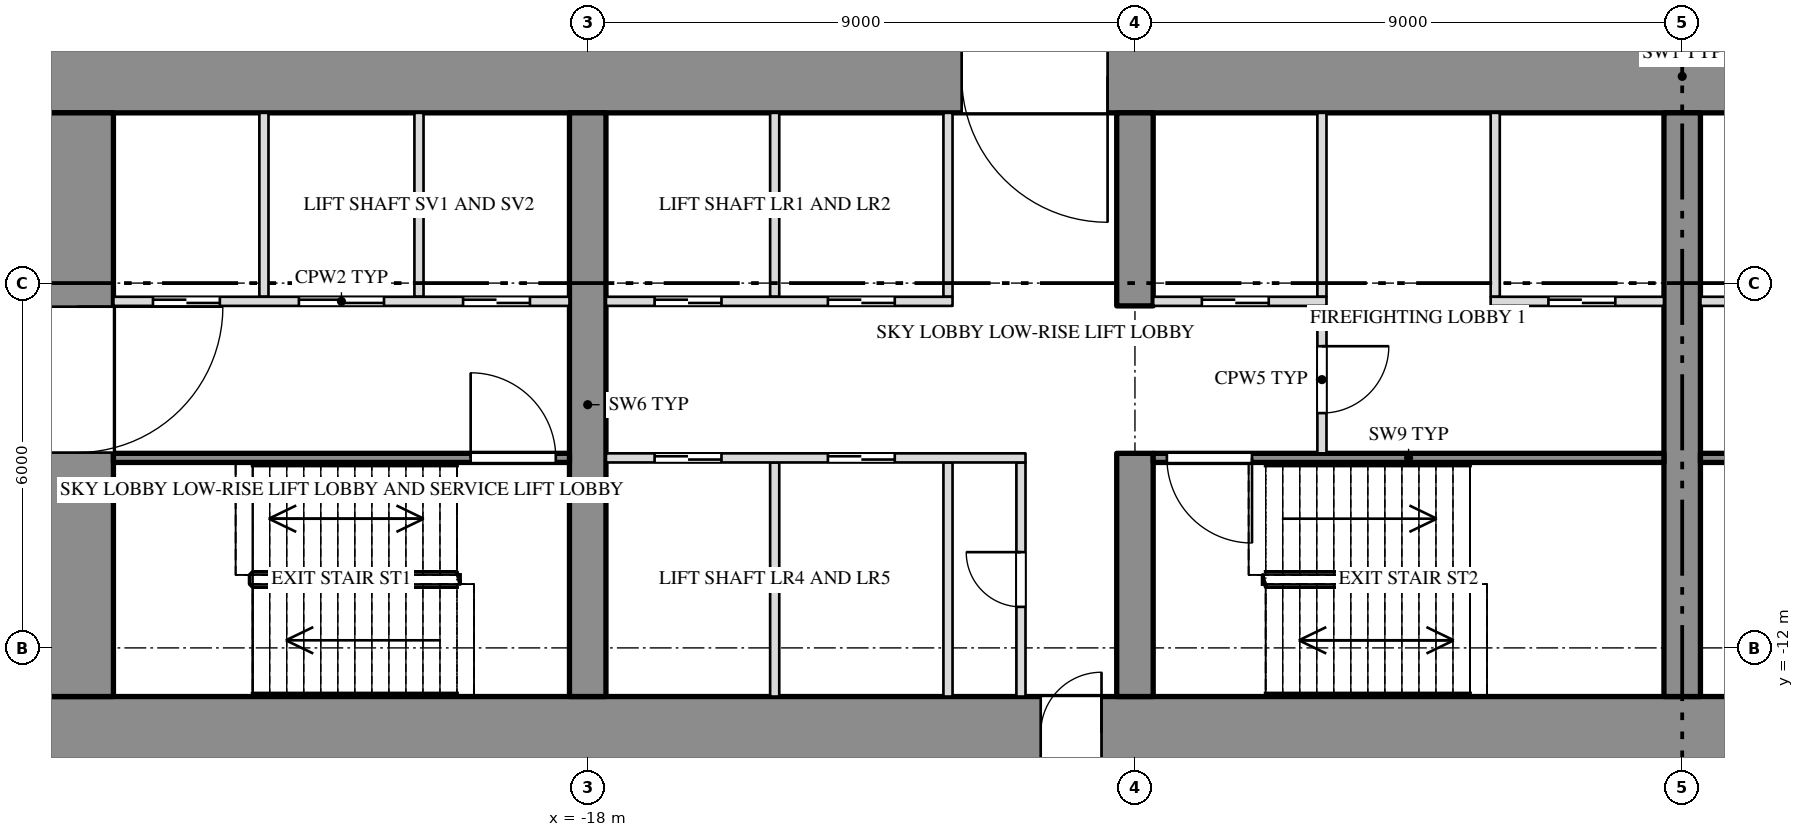
"""IFC4 building model, lengths in metres.
Left out: names, types, materials, properties, quantities, classifications, styles, units other than length and angle.
Written with IfcOpenShell. Run it as: python <this file> out.ifc"""

import sys

from ifc_helpers import new_model, si_unit, direction, frame, frame_2d, origin, place, context, subcontext, project, spatial, rectangle, extrude, element, fill, save


model = new_model("IFC4")
c1 = context("Model", 3, precision=1e-05, world=origin(), true_north=direction((0.0, 1.0)))
c2 = subcontext(c1, "Body", "Model", "MODEL_VIEW")
j1 = project(units=[si_unit("LENGTHUNIT", "METRE"), si_unit("PLANEANGLEUNIT", "RADIAN")], contexts=[c1])
p1 = place(None, origin())
s1 = spatial("IfcSite", under=j1, at=p1, CompositionType="ELEMENT")
p2 = place(p1, origin())
s2 = spatial("IfcBuilding", under=s1, at=p2, CompositionType="ELEMENT")
p3 = place(p2, frame((0.0, 0.0, 100.5)))
s3 = spatial("IfcBuildingStorey", under=s2, at=p3, CompositionType="ELEMENT", Elevation=100.5)
p4 = place(p3, frame((-27.0, -2.6, 0.0), z_axis=(0.0, 0.0, 1.0), x_axis=(1.0, 0.0, 0.0)))
e1 = element("IfcWall", 1, at=p4, inside=s3, PredefinedType="SHEAR", context=c2, shape_type="SweptSolid", body=[
    extrude(rectangle(XDim=54.0, YDim=1.2, at=frame_2d((27.0, 0.0))), origin(), (0.0, 0.0, 1.0), 3.65),
])
p5 = place(p4, frame((15.15, 0.0, 0.0)))
e2 = element("IfcOpeningElement", 2, at=p5, cuts=e1, PredefinedType="OPENING", context=c2, shape_type="SweptSolid", body=[
    extrude(rectangle(XDim=2.4, YDim=2.1, at=frame_2d((1.2, 1.05))), frame((0.0, 0.612, 0.0), z_axis=(0.0, -1.0, 0.0), x_axis=(1.0, 0.0, 0.0)), (0.0, 0.0, 1.0), 1.224),
])
p6 = place(p4, frame((36.45, 0.0, 0.0)))
e3 = element("IfcOpeningElement", 3, at=p6, cuts=e1, PredefinedType="OPENING", context=c2, shape_type="SweptSolid", body=[
    extrude(rectangle(XDim=2.4, YDim=2.1, at=frame_2d((1.2, 1.05))), frame((0.0, 0.612, 0.0), z_axis=(0.0, -1.0, 0.0), x_axis=(1.0, 0.0, 0.0)), (0.0, 0.0, 1.0), 1.224),
])
p7 = place(p3, frame((-27.0, -13.4, 0.0), z_axis=(0.0, 0.0, 1.0), x_axis=(1.0, 0.0, 0.0)))
e4 = element("IfcWall", 4, at=p7, inside=s3, PredefinedType="SHEAR", context=c2, shape_type="SweptSolid", body=[
    extrude(rectangle(XDim=54.0, YDim=1.2, at=frame_2d((27.0, 0.0))), origin(), (0.0, 0.0, 1.0), 3.65),
])
p8 = place(p7, frame((16.45, 0.0, 0.0)))
e5 = element("IfcOpeningElement", 5, at=p8, cuts=e4, PredefinedType="OPENING", context=c2, shape_type="SweptSolid", body=[
    extrude(rectangle(XDim=1.0, YDim=2.1, at=frame_2d((0.5, 1.05))), frame((0.0, 0.612, 0.0), z_axis=(0.0, -1.0, 0.0), x_axis=(1.0, 0.0, 0.0)), (0.0, 0.0, 1.0), 1.224),
])
p9 = place(p7, frame((36.55, 0.0, 0.0)))
e6 = element("IfcOpeningElement", 6, at=p9, cuts=e4, PredefinedType="OPENING", context=c2, shape_type="SweptSolid", body=[
    extrude(rectangle(XDim=1.0, YDim=2.1, at=frame_2d((0.5, 1.05))), frame((0.0, 0.612, 0.0), z_axis=(0.0, -1.0, 0.0), x_axis=(1.0, 0.0, 0.0)), (0.0, 0.0, 1.0), 1.224),
])
p10 = place(p3, frame((-26.4, -12.8, 0.0), z_axis=(0.0, 0.0, 1.0), x_axis=(0.0, 1.0, 0.0)))
e7 = element("IfcWall", 7, at=p10, inside=s3, PredefinedType="SHEAR", context=c2, shape_type="SweptSolid", body=[
    extrude(rectangle(XDim=9.6, YDim=1.2, at=frame_2d((4.8, 0.0))), origin(), (0.0, 0.0, 1.0), 3.65),
])
p11 = place(p10, frame((4.012, 0.0, 0.0)))
e8 = element("IfcOpeningElement", 8, at=p11, cuts=e7, PredefinedType="OPENING", context=c2, shape_type="SweptSolid", body=[
    extrude(rectangle(XDim=2.4, YDim=2.1, at=frame_2d((1.2, 1.05))), frame((0.0, 0.612, 0.0), z_axis=(0.0, -1.0, 0.0), x_axis=(1.0, 0.0, 0.0)), (0.0, 0.0, 1.0), 1.224),
])
p12 = place(p3, frame((-18.0, -12.8, 0.0), z_axis=(0.0, 0.0, 1.0), x_axis=(0.0, 1.0, 0.0)))
e9 = element("IfcWall", 9, at=p12, inside=s3, PredefinedType="SHEAR", context=c2, shape_type="SweptSolid", body=[
    extrude(rectangle(XDim=9.6, YDim=0.6, at=frame_2d((4.8, 0.0))), origin(), (0.0, 0.0, 1.0), 3.65),
])
p13 = place(p3, frame((-9.0, -12.8, 0.0), z_axis=(0.0, 0.0, 1.0), x_axis=(0.0, 1.0, 0.0)))
e10 = element("IfcWall", 10, at=p13, inside=s3, PredefinedType="SHEAR", context=c2, shape_type="SweptSolid", body=[
    extrude(rectangle(XDim=4.0, YDim=0.6, at=frame_2d((2.0, 0.0))), origin(), (0.0, 0.0, 1.0), 3.65),
])
p14 = place(p3, frame((-9.0, -6.375, 0.0), z_axis=(0.0, 0.0, 1.0), x_axis=(0.0, 1.0, 0.0)))
e11 = element("IfcWall", 11, at=p14, inside=s3, PredefinedType="SHEAR", context=c2, shape_type="SweptSolid", body=[
    extrude(rectangle(XDim=3.175, YDim=0.6, at=frame_2d((1.587, 0.0))), origin(), (0.0, 0.0, 1.0), 3.65),
])
p15 = place(p3, frame((0.0, -12.8, 0.0), z_axis=(0.0, 0.0, 1.0), x_axis=(0.0, 1.0, 0.0)))
e12 = element("IfcWall", 12, at=p15, inside=s3, PredefinedType="SHEAR", context=c2, shape_type="SweptSolid", body=[
    extrude(rectangle(XDim=9.6, YDim=0.6, at=frame_2d((4.8, 0.0))), origin(), (0.0, 0.0, 1.0), 3.65),
])
for number, where, z_axis, x_axis in (
    (13, (-20.775, -6.225, 0.0), (0.0, 0.0, 1.0), (0.0, 1.0, 0.0)),
    (14, (-23.325, -6.225, 0.0), (0.0, 0.0, 1.0), (0.0, 1.0, 0.0)),
    (15, (-12.075, -6.225, 0.0), (0.0, 0.0, 1.0), (0.0, 1.0, 0.0)),
    (16, (-14.925, -6.225, 0.0), (0.0, 0.0, 1.0), (0.0, 1.0, 0.0)),
    (17, (-3.075, -6.225, 0.0), (0.0, 0.0, 1.0), (0.0, 1.0, 0.0)),
    (18, (-5.925, -6.225, 0.0), (0.0, 0.0, 1.0), (0.0, 1.0, 0.0)),
):
    element("IfcWall", number, at=place(p3, frame(where, z_axis=z_axis, x_axis=x_axis)), inside=s3, PredefinedType="PARTITIONING", context=c2, shape_type="SweptSolid", body=[
        extrude(rectangle(XDim=3.025, YDim=0.15, at=frame_2d((1.513, 0.0))), origin(), (0.0, 0.0, 1.0), 3.65),
    ])
p16 = place(p3, frame((-10.875, -12.8, 0.0), z_axis=(0.0, 0.0, 1.0), x_axis=(0.0, 1.0, 0.0)))
e19 = element("IfcWall", 19, at=p16, inside=s3, PredefinedType="PARTITIONING", context=c2, shape_type="SweptSolid", body=[
    extrude(rectangle(XDim=3.85, YDim=0.15, at=frame_2d((1.925, 0.0))), origin(), (0.0, 0.0, 1.0), 3.65),
])
p17 = place(p16, frame((1.475, 0.0, 0.0)))
e20 = element("IfcOpeningElement", 20, at=p17, cuts=e19, PredefinedType="OPENING", context=c2, shape_type="SweptSolid", body=[
    extrude(rectangle(XDim=0.9, YDim=2.1, at=frame_2d((0.45, 1.05))), frame((0.0, 0.087, 0.0), z_axis=(0.0, -1.0, 0.0), x_axis=(1.0, 0.0, 0.0)), (0.0, 0.0, 1.0), 0.174),
])
for number, where, z_axis, x_axis in (
    (21, (-12.075, -12.8, 0.0), (0.0, 0.0, 1.0), (0.0, 1.0, 0.0)),
    (22, (-14.925, -12.8, 0.0), (0.0, 0.0, 1.0), (0.0, 1.0, 0.0)),
):
    element("IfcWall", number, at=place(p3, frame(where, z_axis=z_axis, x_axis=x_axis)), inside=s3, PredefinedType="PARTITIONING", context=c2, shape_type="SweptSolid", body=[
        extrude(rectangle(XDim=3.85, YDim=0.15, at=frame_2d((1.925, 0.0))), origin(), (0.0, 0.0, 1.0), 3.65),
    ])
p18 = place(p3, frame((-5.925, -8.8, 0.0), z_axis=(0.0, 0.0, 1.0), x_axis=(0.0, 1.0, 0.0)))
e23 = element("IfcWall", 23, at=p18, inside=s3, PredefinedType="PARTITIONING", context=c2, shape_type="SweptSolid", body=[
    extrude(rectangle(XDim=2.425, YDim=0.15, at=frame_2d((1.212, 0.0))), origin(), (0.0, 0.0, 1.0), 3.65),
])
p19 = place(p18, frame((0.662, 0.0, 0.0)))
e24 = element("IfcOpeningElement", 24, at=p19, cuts=e23, PredefinedType="OPENING", context=c2, shape_type="SweptSolid", body=[
    extrude(rectangle(XDim=1.1, YDim=2.1, at=frame_2d((0.55, 1.05))), frame((0.0, 0.087, 0.0), z_axis=(0.0, -1.0, 0.0), x_axis=(1.0, 0.0, 0.0)), (0.0, 0.0, 1.0), 0.174),
])
p20 = place(p3, frame((-25.8, -6.3, 0.0), z_axis=(0.0, 0.0, 1.0), x_axis=(1.0, 0.0, 0.0)))
e25 = element("IfcWall", 25, at=p20, inside=s3, PredefinedType="PARTITIONING", context=c2, shape_type="SweptSolid", body=[
    extrude(rectangle(XDim=7.5, YDim=0.15, at=frame_2d((3.75, 0.0))), origin(), (0.0, 0.0, 1.0), 3.65),
])
p21 = place(p20, frame((0.65, 0.0, 0.0)))
e26 = element("IfcOpeningElement", 26, at=p21, cuts=e25, PredefinedType="OPENING", context=c2, shape_type="SweptSolid", body=[
    extrude(rectangle(XDim=1.1, YDim=2.1, at=frame_2d((0.55, 1.05))), frame((0.0, 0.087, 0.0), z_axis=(0.0, -1.0, 0.0), x_axis=(1.0, 0.0, 0.0)), (0.0, 0.0, 1.0), 0.174),
])
p22 = place(p20, frame((3.05, 0.0, 0.0)))
e27 = element("IfcOpeningElement", 27, at=p22, cuts=e25, PredefinedType="OPENING", context=c2, shape_type="SweptSolid", body=[
    extrude(rectangle(XDim=1.4, YDim=2.1, at=frame_2d((0.7, 1.05))), frame((0.0, 0.087, 0.0), z_axis=(0.0, -1.0, 0.0), x_axis=(1.0, 0.0, 0.0)), (0.0, 0.0, 1.0), 0.174),
])
p23 = place(p20, frame((5.75, 0.0, 0.0)))
e28 = element("IfcOpeningElement", 28, at=p23, cuts=e25, PredefinedType="OPENING", context=c2, shape_type="SweptSolid", body=[
    extrude(rectangle(XDim=1.1, YDim=2.1, at=frame_2d((0.55, 1.05))), frame((0.0, 0.087, 0.0), z_axis=(0.0, -1.0, 0.0), x_axis=(1.0, 0.0, 0.0)), (0.0, 0.0, 1.0), 0.174),
])
p24 = place(p3, frame((-17.7, -6.3, 0.0), z_axis=(0.0, 0.0, 1.0), x_axis=(1.0, 0.0, 0.0)))
e29 = element("IfcWall", 29, at=p24, inside=s3, PredefinedType="PARTITIONING", context=c2, shape_type="SweptSolid", body=[
    extrude(rectangle(XDim=5.7, YDim=0.15, at=frame_2d((2.85, 0.0))), origin(), (0.0, 0.0, 1.0), 3.65),
])
p25 = place(p24, frame((0.8, 0.0, 0.0)))
e30 = element("IfcOpeningElement", 30, at=p25, cuts=e29, PredefinedType="OPENING", context=c2, shape_type="SweptSolid", body=[
    extrude(rectangle(XDim=1.1, YDim=2.1, at=frame_2d((0.55, 1.05))), frame((0.0, 0.087, 0.0), z_axis=(0.0, -1.0, 0.0), x_axis=(1.0, 0.0, 0.0)), (0.0, 0.0, 1.0), 0.174),
])
p26 = place(p24, frame((3.65, 0.0, 0.0)))
e31 = element("IfcOpeningElement", 31, at=p26, cuts=e29, PredefinedType="OPENING", context=c2, shape_type="SweptSolid", body=[
    extrude(rectangle(XDim=1.1, YDim=2.1, at=frame_2d((0.55, 1.05))), frame((0.0, 0.087, 0.0), z_axis=(0.0, -1.0, 0.0), x_axis=(1.0, 0.0, 0.0)), (0.0, 0.0, 1.0), 0.174),
])
p27 = place(p3, frame((-8.7, -6.3, 0.0), z_axis=(0.0, 0.0, 1.0), x_axis=(1.0, 0.0, 0.0)))
e32 = element("IfcWall", 32, at=p27, inside=s3, PredefinedType="PARTITIONING", context=c2, shape_type="SweptSolid", body=[
    extrude(rectangle(XDim=2.85, YDim=0.15, at=frame_2d((1.425, 0.0))), origin(), (0.0, 0.0, 1.0), 3.65),
])
p28 = place(p27, frame((0.8, 0.0, 0.0)))
e33 = element("IfcOpeningElement", 33, at=p28, cuts=e32, PredefinedType="OPENING", context=c2, shape_type="SweptSolid", body=[
    extrude(rectangle(XDim=1.1, YDim=2.1, at=frame_2d((0.55, 1.05))), frame((0.0, 0.087, 0.0), z_axis=(0.0, -1.0, 0.0), x_axis=(1.0, 0.0, 0.0)), (0.0, 0.0, 1.0), 0.174),
])
p29 = place(p3, frame((-3.15, -6.3, 0.0), z_axis=(0.0, 0.0, 1.0), x_axis=(1.0, 0.0, 0.0)))
e34 = element("IfcWall", 34, at=p29, inside=s3, PredefinedType="PARTITIONING", context=c2, shape_type="SweptSolid", body=[
    extrude(rectangle(XDim=2.85, YDim=0.15, at=frame_2d((1.425, 0.0))), origin(), (0.0, 0.0, 1.0), 3.65),
])
p30 = place(p29, frame((0.95, 0.0, 0.0)))
e35 = element("IfcOpeningElement", 35, at=p30, cuts=e34, PredefinedType="OPENING", context=c2, shape_type="SweptSolid", body=[
    extrude(rectangle(XDim=1.1, YDim=2.1, at=frame_2d((0.55, 1.05))), frame((0.0, 0.087, 0.0), z_axis=(0.0, -1.0, 0.0), x_axis=(1.0, 0.0, 0.0)), (0.0, 0.0, 1.0), 0.174),
])
p31 = place(p3, frame((0.3, -6.3, 0.0), z_axis=(0.0, 0.0, 1.0), x_axis=(1.0, 0.0, 0.0)))
e36 = element("IfcWall", 36, at=p31, inside=s3, PredefinedType="PARTITIONING", context=c2, shape_type="SweptSolid", body=[
    extrude(rectangle(XDim=2.85, YDim=0.15, at=frame_2d((1.425, 0.0))), origin(), (0.0, 0.0, 1.0), 3.65),
])
p32 = place(p31, frame((0.8, 0.0, 0.0)))
e37 = element("IfcOpeningElement", 37, at=p32, cuts=e36, PredefinedType="OPENING", context=c2, shape_type="SweptSolid", body=[
    extrude(rectangle(XDim=1.1, YDim=2.1, at=frame_2d((0.55, 1.05))), frame((0.0, 0.087, 0.0), z_axis=(0.0, -1.0, 0.0), x_axis=(1.0, 0.0, 0.0)), (0.0, 0.0, 1.0), 0.174),
])
p33 = place(p3, frame((-25.8, -8.875, 0.0), z_axis=(0.0, 0.0, 1.0), x_axis=(1.0, 0.0, 0.0)))
e38 = element("IfcWall", 38, at=p33, inside=s3, PredefinedType="SHEAR", context=c2, shape_type="SweptSolid", body=[
    extrude(rectangle(XDim=7.5, YDim=0.15, at=frame_2d((3.75, 0.0))), origin(), (0.0, 0.0, 1.0), 3.65),
])
p34 = place(p33, frame((5.875, 0.0, 0.0)))
e39 = element("IfcOpeningElement", 39, at=p34, cuts=e38, PredefinedType="OPENING", context=c2, shape_type="SweptSolid", body=[
    extrude(rectangle(XDim=1.4, YDim=2.1, at=frame_2d((0.7, 1.05))), frame((0.0, 0.087, 0.0), z_axis=(0.0, -1.0, 0.0), x_axis=(1.0, 0.0, 0.0)), (0.0, 0.0, 1.0), 0.174),
])
p35 = place(p3, frame((-17.7, -8.875, 0.0), z_axis=(0.0, 0.0, 1.0), x_axis=(1.0, 0.0, 0.0)))
e40 = element("IfcWall", 40, at=p35, inside=s3, PredefinedType="PARTITIONING", context=c2, shape_type="SweptSolid", body=[
    extrude(rectangle(XDim=6.9, YDim=0.15, at=frame_2d((3.45, 0.0))), origin(), (0.0, 0.0, 1.0), 3.65),
])
p36 = place(p35, frame((0.8, 0.0, 0.0)))
e41 = element("IfcOpeningElement", 41, at=p36, cuts=e40, PredefinedType="OPENING", context=c2, shape_type="SweptSolid", body=[
    extrude(rectangle(XDim=1.1, YDim=2.1, at=frame_2d((0.55, 1.05))), frame((0.0, 0.087, 0.0), z_axis=(0.0, -1.0, 0.0), x_axis=(1.0, 0.0, 0.0)), (0.0, 0.0, 1.0), 0.174),
])
p37 = place(p35, frame((3.65, 0.0, 0.0)))
e42 = element("IfcOpeningElement", 42, at=p37, cuts=e40, PredefinedType="OPENING", context=c2, shape_type="SweptSolid", body=[
    extrude(rectangle(XDim=1.1, YDim=2.1, at=frame_2d((0.55, 1.05))), frame((0.0, 0.087, 0.0), z_axis=(0.0, -1.0, 0.0), x_axis=(1.0, 0.0, 0.0)), (0.0, 0.0, 1.0), 0.174),
])
p38 = place(p3, frame((-8.7, -8.875, 0.0), z_axis=(0.0, 0.0, 1.0), x_axis=(1.0, 0.0, 0.0)))
e43 = element("IfcWall", 43, at=p38, inside=s3, PredefinedType="SHEAR", context=c2, shape_type="SweptSolid", body=[
    extrude(rectangle(XDim=8.4, YDim=0.15, at=frame_2d((4.2, 0.0))), origin(), (0.0, 0.0, 1.0), 3.65),
])
p39 = place(p38, frame((0.225, 0.0, 0.0)))
e44 = element("IfcOpeningElement", 44, at=p39, cuts=e43, PredefinedType="OPENING", context=c2, shape_type="SweptSolid", body=[
    extrude(rectangle(XDim=1.4, YDim=2.1, at=frame_2d((0.7, 1.05))), frame((0.0, 0.087, 0.0), z_axis=(0.0, -1.0, 0.0), x_axis=(1.0, 0.0, 0.0)), (0.0, 0.0, 1.0), 0.174),
])
p40 = place(p3, frame((0.3, -8.875, 0.0), z_axis=(0.0, 0.0, 1.0), x_axis=(1.0, 0.0, 0.0)))
e45 = element("IfcWall", 45, at=p40, inside=s3, PredefinedType="SHEAR", context=c2, shape_type="SweptSolid", body=[
    extrude(rectangle(XDim=8.4, YDim=0.15, at=frame_2d((4.2, 0.0))), origin(), (0.0, 0.0, 1.0), 3.65),
])
p41 = place(p40, frame((6.775, 0.0, 0.0)))
e46 = element("IfcOpeningElement", 46, at=p41, cuts=e45, PredefinedType="OPENING", context=c2, shape_type="SweptSolid", body=[
    extrude(rectangle(XDim=1.4, YDim=2.1, at=frame_2d((0.7, 1.05))), frame((0.0, 0.087, 0.0), z_axis=(0.0, -1.0, 0.0), x_axis=(1.0, 0.0, 0.0)), (0.0, 0.0, 1.0), 0.174),
])
p42 = place(p11, origin())
e47 = element("IfcDoor", 47, at=p42, inside=s3, OperationType="DOUBLE_DOOR_SINGLE_SWING", PredefinedType="DOOR", context=c2, shape_type="SweptSolid", body=[
    extrude(rectangle(XDim=2.4, YDim=2.1, at=frame_2d((1.2, 1.05))), frame((0.0, 0.025, 0.0), z_axis=(0.0, -1.0, 0.0), x_axis=(1.0, 0.0, 0.0)), (0.0, 0.0, 1.0), 0.05),
])
fill(e8, e47)
p43 = place(p21, origin())
e48 = element("IfcDoor", 48, at=p43, inside=s3, OperationType="SLIDING_TO_RIGHT", PredefinedType="DOOR", context=c2, shape_type="SweptSolid", body=[
    extrude(rectangle(XDim=1.1, YDim=2.1, at=frame_2d((0.55, 1.05))), frame((0.0, 0.025, 0.0), z_axis=(0.0, -1.0, 0.0), x_axis=(1.0, 0.0, 0.0)), (0.0, 0.0, 1.0), 0.05),
])
fill(e26, e48)
p44 = place(p22, origin())
e49 = element("IfcDoor", 49, at=p44, inside=s3, OperationType="SLIDING_TO_LEFT", PredefinedType="DOOR", context=c2, shape_type="SweptSolid", body=[
    extrude(rectangle(XDim=1.4, YDim=2.1, at=frame_2d((0.7, 1.05))), frame((0.0, 0.025, 0.0), z_axis=(0.0, -1.0, 0.0), x_axis=(1.0, 0.0, 0.0)), (0.0, 0.0, 1.0), 0.05),
])
fill(e27, e49)
p45 = place(p23, origin())
e50 = element("IfcDoor", 50, at=p45, inside=s3, OperationType="SLIDING_TO_RIGHT", PredefinedType="DOOR", context=c2, shape_type="SweptSolid", body=[
    extrude(rectangle(XDim=1.1, YDim=2.1, at=frame_2d((0.55, 1.05))), frame((0.0, 0.025, 0.0), z_axis=(0.0, -1.0, 0.0), x_axis=(1.0, 0.0, 0.0)), (0.0, 0.0, 1.0), 0.05),
])
fill(e28, e50)
p46 = place(p34, origin())
e51 = element("IfcDoor", 51, at=p46, inside=s3, OperationType="DOUBLE_DOOR_SINGLE_SWING", PredefinedType="DOOR", context=c2, shape_type="SweptSolid", body=[
    extrude(rectangle(XDim=1.4, YDim=2.1, at=frame_2d((0.7, 1.05))), frame((0.0, 0.025, 0.0), z_axis=(0.0, -1.0, 0.0), x_axis=(1.0, 0.0, 0.0)), (0.0, 0.0, 1.0), 0.05),
])
fill(e39, e51)
p47 = place(p36, origin())
e52 = element("IfcDoor", 52, at=p47, inside=s3, OperationType="SLIDING_TO_RIGHT", PredefinedType="DOOR", context=c2, shape_type="SweptSolid", body=[
    extrude(rectangle(XDim=1.1, YDim=2.1, at=frame_2d((0.55, 1.05))), frame((0.0, 0.025, 0.0), z_axis=(0.0, -1.0, 0.0), x_axis=(1.0, 0.0, 0.0)), (0.0, 0.0, 1.0), 0.05),
])
fill(e41, e52)
p48 = place(p25, origin())
e53 = element("IfcDoor", 53, at=p48, inside=s3, OperationType="SLIDING_TO_LEFT", PredefinedType="DOOR", context=c2, shape_type="SweptSolid", body=[
    extrude(rectangle(XDim=1.1, YDim=2.1, at=frame_2d((0.55, 1.05))), frame((0.0, 0.025, 0.0), z_axis=(0.0, -1.0, 0.0), x_axis=(1.0, 0.0, 0.0)), (0.0, 0.0, 1.0), 0.05),
])
fill(e30, e53)
p49 = place(p37, origin())
e54 = element("IfcDoor", 54, at=p49, inside=s3, OperationType="SLIDING_TO_RIGHT", PredefinedType="DOOR", context=c2, shape_type="SweptSolid", body=[
    extrude(rectangle(XDim=1.1, YDim=2.1, at=frame_2d((0.55, 1.05))), frame((0.0, 0.025, 0.0), z_axis=(0.0, -1.0, 0.0), x_axis=(1.0, 0.0, 0.0)), (0.0, 0.0, 1.0), 0.05),
])
fill(e42, e54)
p50 = place(p26, origin())
e55 = element("IfcDoor", 55, at=p50, inside=s3, OperationType="SLIDING_TO_LEFT", PredefinedType="DOOR", context=c2, shape_type="SweptSolid", body=[
    extrude(rectangle(XDim=1.1, YDim=2.1, at=frame_2d((0.55, 1.05))), frame((0.0, 0.025, 0.0), z_axis=(0.0, -1.0, 0.0), x_axis=(1.0, 0.0, 0.0)), (0.0, 0.0, 1.0), 0.05),
])
fill(e31, e55)
p51 = place(p17, origin())
e56 = element("IfcDoor", 56, at=p51, inside=s3, OperationType="SINGLE_SWING_RIGHT", PredefinedType="DOOR", context=c2, shape_type="SweptSolid", body=[
    extrude(rectangle(XDim=0.9, YDim=2.1, at=frame_2d((0.45, 1.05))), frame((0.0, 0.025, 0.0), z_axis=(0.0, -1.0, 0.0), x_axis=(1.0, 0.0, 0.0)), (0.0, 0.0, 1.0), 0.05),
])
fill(e20, e56)
p52 = place(p5, origin())
e57 = element("IfcDoor", 57, at=p52, inside=s3, OperationType="DOUBLE_DOOR_SINGLE_SWING", PredefinedType="DOOR", context=c2, shape_type="SweptSolid", body=[
    extrude(rectangle(XDim=2.4, YDim=2.1, at=frame_2d((1.2, 1.05))), frame((0.0, 0.025, 0.0), z_axis=(0.0, -1.0, 0.0), x_axis=(1.0, 0.0, 0.0)), (0.0, 0.0, 1.0), 0.05),
])
fill(e2, e57)
p53 = place(p8, origin())
e58 = element("IfcDoor", 58, at=p53, inside=s3, OperationType="SINGLE_SWING_RIGHT", PredefinedType="DOOR", context=c2, shape_type="SweptSolid", body=[
    extrude(rectangle(XDim=1.0, YDim=2.1, at=frame_2d((0.5, 1.05))), frame((0.0, 0.025, 0.0), z_axis=(0.0, -1.0, 0.0), x_axis=(1.0, 0.0, 0.0)), (0.0, 0.0, 1.0), 0.05),
])
fill(e5, e58)
p54 = place(p39, origin())
e59 = element("IfcDoor", 59, at=p54, inside=s3, OperationType="DOUBLE_DOOR_SINGLE_SWING", PredefinedType="DOOR", context=c2, shape_type="SweptSolid", body=[
    extrude(rectangle(XDim=1.4, YDim=2.1, at=frame_2d((0.7, 1.05))), frame((0.0, 0.025, 0.0), z_axis=(0.0, -1.0, 0.0), x_axis=(1.0, 0.0, 0.0)), (0.0, 0.0, 1.0), 0.05),
])
fill(e44, e59)
p55 = place(p28, origin())
e60 = element("IfcDoor", 60, at=p55, inside=s3, OperationType="SLIDING_TO_RIGHT", PredefinedType="DOOR", context=c2, shape_type="SweptSolid", body=[
    extrude(rectangle(XDim=1.1, YDim=2.1, at=frame_2d((0.55, 1.05))), frame((0.0, 0.025, 0.0), z_axis=(0.0, -1.0, 0.0), x_axis=(1.0, 0.0, 0.0)), (0.0, 0.0, 1.0), 0.05),
])
fill(e33, e60)
p56 = place(p19, origin())
e61 = element("IfcDoor", 61, at=p56, inside=s3, OperationType="SINGLE_SWING_LEFT", PredefinedType="DOOR", context=c2, shape_type="SweptSolid", body=[
    extrude(rectangle(XDim=1.1, YDim=2.1, at=frame_2d((0.55, 1.05))), frame((0.0, 0.025, 0.0), z_axis=(0.0, -1.0, 0.0), x_axis=(1.0, 0.0, 0.0)), (0.0, 0.0, 1.0), 0.05),
])
fill(e24, e61)
p57 = place(p30, origin())
e62 = element("IfcDoor", 62, at=p57, inside=s3, OperationType="SLIDING_TO_RIGHT", PredefinedType="DOOR", context=c2, shape_type="SweptSolid", body=[
    extrude(rectangle(XDim=1.1, YDim=2.1, at=frame_2d((0.55, 1.05))), frame((0.0, 0.025, 0.0), z_axis=(0.0, -1.0, 0.0), x_axis=(1.0, 0.0, 0.0)), (0.0, 0.0, 1.0), 0.05),
])
fill(e35, e62)
save(model, sys.argv[1])
